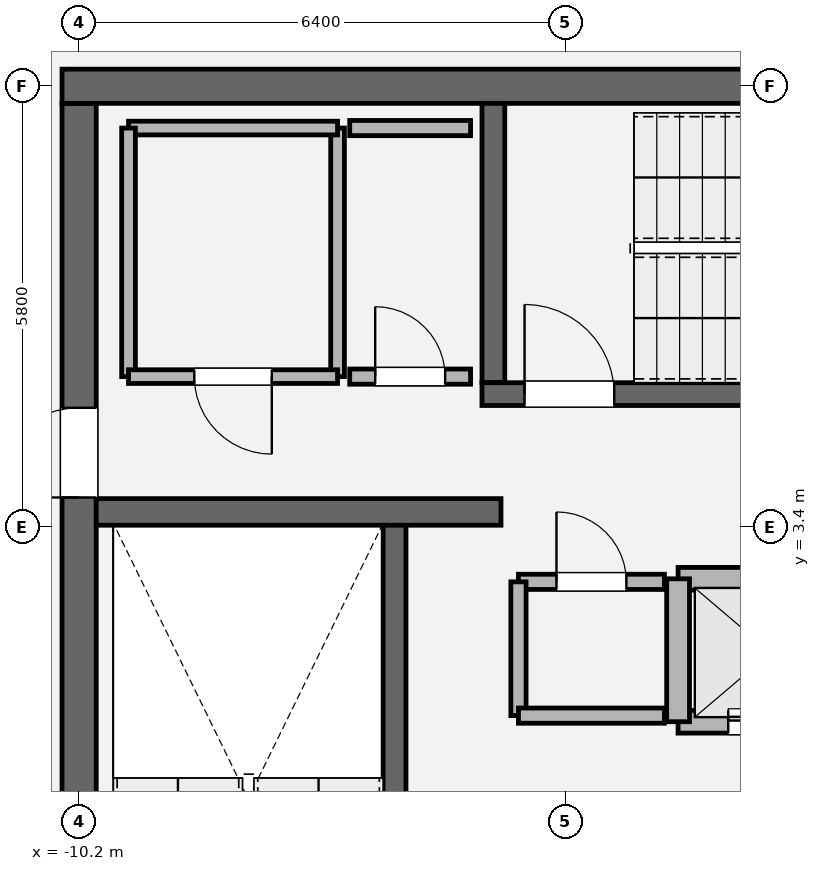
"""IFC4 building model, lengths in metres.
Left out: names, types, materials, properties, quantities, classifications, styles, units other than length and angle.
Written with IfcOpenShell. Run it as: python <this file> out.ifc"""

import sys

from ifc_helpers import new_model, si_unit, direction, frame, frame_2d, origin, place, context, subcontext, project, spatial, rectangle, extrude, element, fill, save


model = new_model("IFC4")
c1 = context("Model", 3, precision=1e-05, world=origin(), true_north=direction((0.0, 1.0)))
c2 = subcontext(c1, "Body", "Model", "MODEL_VIEW")
j1 = project(units=[si_unit("LENGTHUNIT", "METRE"), si_unit("PLANEANGLEUNIT", "RADIAN")], contexts=[c1])
p1 = place(None, origin())
s1 = spatial("IfcSite", under=j1, at=p1, CompositionType="ELEMENT")
p2 = place(p1, origin())
s2 = spatial("IfcBuilding", under=s1, at=p2, CompositionType="ELEMENT")
p3 = place(p2, frame((0.0, 0.0, 321.6)))
s3 = spatial("IfcBuildingStorey", under=s2, at=p3, CompositionType="ELEMENT", Elevation=321.6)
p4 = place(p3, frame((-10.2, -8.975, 0.0), z_axis=(0.0, 0.0, 1.0), x_axis=(0.0, 1.0, 0.0)))
e1 = element("IfcWall", 1, at=p4, inside=s3, PredefinedType="SHEAR", context=c2, shape_type="SweptSolid", body=[
    extrude(rectangle(XDim=17.95, YDim=0.45, at=frame_2d((8.975, 0.0))), origin(), (0.0, 0.0, 1.0), 4.2),
])
p5 = place(p4, frame((12.765, 0.0, 0.0)))
e2 = element("IfcOpeningElement", 2, at=p5, cuts=e1, PredefinedType="OPENING", context=c2, shape_type="SweptSolid", body=[
    extrude(rectangle(XDim=1.18, YDim=2.2, at=frame_2d((0.59, 1.1))), frame((0.0, 0.235, 0.0), z_axis=(0.0, -1.0, 0.0), x_axis=(1.0, 0.0, 0.0)), (0.0, 0.0, 1.0), 0.47),
])
p6 = place(p3, frame((-10.425, 9.2, 0.0), z_axis=(0.0, 0.0, 1.0), x_axis=(1.0, 0.0, 0.0)))
e3 = element("IfcWall", 3, at=p6, inside=s3, PredefinedType="SHEAR", context=c2, shape_type="SweptSolid", body=[
    extrude(rectangle(XDim=20.85, YDim=0.45, at=frame_2d((10.425, 0.0))), origin(), (0.0, 0.0, 1.0), 4.2),
])
p7 = place(p3, frame((-6.05, -5.5, 0.0), z_axis=(0.0, 0.0, 1.0), x_axis=(0.0, 1.0, 0.0)))
e4 = element("IfcWall", 4, at=p7, inside=s3, PredefinedType="SOLIDWALL", context=c2, shape_type="SweptSolid", body=[
    extrude(rectangle(XDim=8.95, YDim=0.3, at=frame_2d((4.475, 0.0))), origin(), (0.0, 0.0, 1.0), 4.2),
])
p8 = place(p3, frame((-4.75, 5.3, 0.0), z_axis=(0.0, 0.0, 1.0), x_axis=(0.0, 1.0, 0.0)))
e5 = element("IfcWall", 5, at=p8, inside=s3, PredefinedType="SOLIDWALL", context=c2, shape_type="SweptSolid", body=[
    extrude(rectangle(XDim=3.675, YDim=0.3, at=frame_2d((1.837, 0.0))), origin(), (0.0, 0.0, 1.0), 4.2),
])
p9 = place(p3, frame((-4.9, 5.15, 0.0), z_axis=(0.0, 0.0, 1.0), x_axis=(1.0, 0.0, 0.0)))
e6 = element("IfcWall", 6, at=p9, inside=s3, PredefinedType="SOLIDWALL", context=c2, shape_type="SweptSolid", body=[
    extrude(rectangle(XDim=9.8, YDim=0.3, at=frame_2d((4.9, 0.0))), origin(), (0.0, 0.0, 1.0), 4.2),
])
p10 = place(p9, frame((0.56, 0.0, 0.0)))
e7 = element("IfcOpeningElement", 7, at=p10, cuts=e6, PredefinedType="OPENING", context=c2, shape_type="SweptSolid", body=[
    extrude(rectangle(XDim=1.18, YDim=2.2, at=frame_2d((0.59, 1.1))), frame((0.0, 0.16, 0.0), z_axis=(0.0, -1.0, 0.0), x_axis=(1.0, 0.0, 0.0)), (0.0, 0.0, 1.0), 0.32),
])
p11 = place(p3, frame((-9.975, 3.6, 0.0), z_axis=(0.0, 0.0, 1.0), x_axis=(1.0, 0.0, 0.0)))
e8 = element("IfcWall", 8, at=p11, inside=s3, PredefinedType="SOLIDWALL", context=c2, shape_type="SweptSolid", body=[
    extrude(rectangle(XDim=5.325, YDim=0.35, at=frame_2d((2.663, 0.0))), origin(), (0.0, 0.0, 1.0), 4.2),
])
p12 = place(p3, frame((-2.32, 0.84, 0.0), z_axis=(0.0, 0.0, 1.0), x_axis=(1.0, 0.0, 0.0)))
e9 = element("IfcWall", 9, at=p12, inside=s3, PredefinedType="SOLIDWALL", context=c2, shape_type="SweptSolid", body=[
    extrude(rectangle(XDim=4.64, YDim=0.3, at=frame_2d((2.32, 0.0))), origin(), (0.0, 0.0, 1.0), 4.0),
])
p13 = place(p12, frame((0.66, 0.0, 0.0)))
e10 = element("IfcOpeningElement", 10, at=p13, cuts=e9, PredefinedType="OPENING", context=c2, shape_type="SweptSolid", body=[
    extrude(rectangle(XDim=1.12, YDim=2.25, at=frame_2d((0.56, 1.125))), frame((0.0, 0.16, 0.0), z_axis=(0.0, -1.0, 0.0), x_axis=(1.0, 0.0, 0.0)), (0.0, 0.0, 1.0), 0.32),
])
p14 = place(p12, frame((2.86, 0.0, 0.0)))
e11 = element("IfcOpeningElement", 11, at=p14, cuts=e9, PredefinedType="OPENING", context=c2, shape_type="SweptSolid", body=[
    extrude(rectangle(XDim=1.12, YDim=2.25, at=frame_2d((0.56, 1.125))), frame((0.0, 0.16, 0.0), z_axis=(0.0, -1.0, 0.0), x_axis=(1.0, 0.0, 0.0)), (0.0, 0.0, 1.0), 0.32),
])
p15 = place(p3, frame((-2.32, 2.72, 0.0), z_axis=(0.0, 0.0, 1.0), x_axis=(1.0, 0.0, 0.0)))
e12 = element("IfcWall", 12, at=p15, inside=s3, PredefinedType="SOLIDWALL", context=c2, shape_type="SweptSolid", body=[
    extrude(rectangle(XDim=4.64, YDim=0.3, at=frame_2d((2.32, 0.0))), origin(), (0.0, 0.0, 1.0), 4.0),
])
p16 = place(p3, frame((-2.32, 0.84, 0.0), z_axis=(0.0, 0.0, 1.0), x_axis=(0.0, 1.0, 0.0)))
e13 = element("IfcWall", 13, at=p16, inside=s3, PredefinedType="SOLIDWALL", context=c2, shape_type="SweptSolid", body=[
    extrude(rectangle(XDim=1.88, YDim=0.3, at=frame_2d((0.94, 0.0))), origin(), (0.0, 0.0, 1.0), 4.0),
])
p17 = place(p3, frame((-2.5, 2.68, 0.0), z_axis=(0.0, 0.0, 1.0), x_axis=(-1.0, 0.0, 0.0)))
e14 = element("IfcWall", 14, at=p17, inside=s3, PredefinedType="SOLIDWALL", context=c2, shape_type="SweptSolid", body=[
    extrude(rectangle(XDim=1.92, YDim=0.2, at=frame_2d((0.96, 0.0))), origin(), (0.0, 0.0, 1.0), 4.0),
])
p18 = place(p17, frame((0.5, 0.0, 0.0)))
e15 = element("IfcOpeningElement", 15, at=p18, cuts=e14, PredefinedType="OPENING", context=c2, shape_type="SweptSolid", body=[
    extrude(rectangle(XDim=0.92, YDim=2.1, at=frame_2d((0.46, 1.05))), frame((0.0, 0.11, 0.0), z_axis=(0.0, -1.0, 0.0), x_axis=(1.0, 0.0, 0.0)), (0.0, 0.0, 1.0), 0.22),
])
p19 = place(p3, frame((-4.42, 2.68, 0.0), z_axis=(0.0, 0.0, 1.0), x_axis=(0.0, -1.0, 0.0)))
e16 = element("IfcWall", 16, at=p19, inside=s3, PredefinedType="SOLIDWALL", context=c2, shape_type="SweptSolid", body=[
    extrude(rectangle(XDim=1.76, YDim=0.2, at=frame_2d((0.88, 0.0))), origin(), (0.0, 0.0, 1.0), 4.0),
])
p20 = place(p3, frame((-4.42, 0.92, 0.0), z_axis=(0.0, 0.0, 1.0), x_axis=(1.0, 0.0, 0.0)))
e17 = element("IfcWall", 17, at=p20, inside=s3, PredefinedType="SOLIDWALL", context=c2, shape_type="SweptSolid", body=[
    extrude(rectangle(XDim=1.92, YDim=0.2, at=frame_2d((0.96, 0.0))), origin(), (0.0, 0.0, 1.0), 4.0),
])
p21 = place(p3, frame((-6.8, 5.38, 0.0), z_axis=(0.0, 0.0, 1.0), x_axis=(0.0, 1.0, 0.0)))
e18 = element("IfcWall", 18, at=p21, inside=s3, PredefinedType="PARTITIONING", context=c2, shape_type="SweptSolid", body=[
    extrude(rectangle(XDim=3.27, YDim=0.18, at=frame_2d((1.635, 0.0))), origin(), (0.0, 0.0, 1.0), 4.0),
])
p22 = place(p3, frame((-6.8, 8.65, 0.0), z_axis=(0.0, 0.0, 1.0), x_axis=(-1.0, 0.0, 0.0)))
e19 = element("IfcWall", 19, at=p22, inside=s3, PredefinedType="PARTITIONING", context=c2, shape_type="SweptSolid", body=[
    extrude(rectangle(XDim=2.75, YDim=0.18, at=frame_2d((1.375, 0.0))), origin(), (0.0, 0.0, 1.0), 4.0),
])
p23 = place(p3, frame((-9.55, 8.65, 0.0), z_axis=(0.0, 0.0, 1.0), x_axis=(0.0, -1.0, 0.0)))
e20 = element("IfcWall", 20, at=p23, inside=s3, PredefinedType="PARTITIONING", context=c2, shape_type="SweptSolid", body=[
    extrude(rectangle(XDim=3.27, YDim=0.18, at=frame_2d((1.635, 0.0))), origin(), (0.0, 0.0, 1.0), 4.0),
])
p24 = place(p3, frame((-9.55, 5.38, 0.0), z_axis=(0.0, 0.0, 1.0), x_axis=(1.0, 0.0, 0.0)))
e21 = element("IfcWall", 21, at=p24, inside=s3, PredefinedType="PARTITIONING", context=c2, shape_type="SweptSolid", body=[
    extrude(rectangle(XDim=2.75, YDim=0.18, at=frame_2d((1.375, 0.0))), origin(), (0.0, 0.0, 1.0), 4.0),
])
p25 = place(p24, frame((0.865, 0.0, 0.0)))
e22 = element("IfcOpeningElement", 22, at=p25, cuts=e21, PredefinedType="OPENING", context=c2, shape_type="SweptSolid", body=[
    extrude(rectangle(XDim=1.02, YDim=2.2, at=frame_2d((0.51, 1.1))), frame((0.0, 0.1, 0.0), z_axis=(0.0, -1.0, 0.0), x_axis=(1.0, 0.0, 0.0)), (0.0, 0.0, 1.0), 0.2),
])
p26 = place(p3, frame((-5.05, 8.65, 0.0), z_axis=(0.0, 0.0, 1.0), x_axis=(-1.0, 0.0, 0.0)))
e23 = element("IfcWall", 23, at=p26, inside=s3, PredefinedType="SOLIDWALL", context=c2, shape_type="SweptSolid", body=[
    extrude(rectangle(XDim=1.59, YDim=0.2, at=frame_2d((0.795, 0.0))), origin(), (0.0, 0.0, 1.0), 4.0),
])
p27 = place(p3, frame((-6.64, 5.38, 0.0), z_axis=(0.0, 0.0, 1.0), x_axis=(1.0, 0.0, 0.0)))
e24 = element("IfcWall", 24, at=p27, inside=s3, PredefinedType="SOLIDWALL", context=c2, shape_type="SweptSolid", body=[
    extrude(rectangle(XDim=1.59, YDim=0.2, at=frame_2d((0.795, 0.0))), origin(), (0.0, 0.0, 1.0), 4.0),
])
p28 = place(p27, frame((0.335, 0.0, 0.0)))
e25 = element("IfcOpeningElement", 25, at=p28, cuts=e24, PredefinedType="OPENING", context=c2, shape_type="SweptSolid", body=[
    extrude(rectangle(XDim=0.92, YDim=2.1, at=frame_2d((0.46, 1.05))), frame((0.0, 0.11, 0.0), z_axis=(0.0, -1.0, 0.0), x_axis=(1.0, 0.0, 0.0)), (0.0, 0.0, 1.0), 0.22),
])
p29 = place(p10, origin())
e26 = element("IfcDoor", 26, at=p29, inside=s3, OperationType="SINGLE_SWING_LEFT", PredefinedType="DOOR", context=c2, shape_type="SweptSolid", body=[
    extrude(rectangle(XDim=1.18, YDim=2.2, at=frame_2d((0.59, 1.1))), frame((0.0, 0.025, 0.0), z_axis=(0.0, -1.0, 0.0), x_axis=(1.0, 0.0, 0.0)), (0.0, 0.0, 1.0), 0.05),
])
fill(e7, e26)
p30 = place(p5, origin())
e27 = element("IfcDoor", 27, at=p30, inside=s3, OperationType="SINGLE_SWING_LEFT", PredefinedType="DOOR", context=c2, shape_type="SweptSolid", body=[
    extrude(rectangle(XDim=1.18, YDim=2.2, at=frame_2d((0.59, 1.1))), frame((0.0, 0.025, 0.0), z_axis=(0.0, -1.0, 0.0), x_axis=(1.0, 0.0, 0.0)), (0.0, 0.0, 1.0), 0.05),
])
fill(e2, e27)
p31 = place(p13, origin())
e28 = element("IfcDoor", 28, at=p31, inside=s3, OperationType="DOUBLE_DOOR_SLIDING", PredefinedType="DOOR", context=c2, shape_type="SweptSolid", body=[
    extrude(rectangle(XDim=1.12, YDim=2.25, at=frame_2d((0.56, 1.125))), frame((0.0, 0.025, 0.0), z_axis=(0.0, -1.0, 0.0), x_axis=(1.0, 0.0, 0.0)), (0.0, 0.0, 1.0), 0.05),
])
fill(e10, e28)
p32 = place(p18, origin())
e29 = element("IfcDoor", 29, at=p32, inside=s3, OperationType="SINGLE_SWING_RIGHT", PredefinedType="DOOR", context=c2, shape_type="SweptSolid", body=[
    extrude(rectangle(XDim=0.92, YDim=2.1, at=frame_2d((0.46, 1.05))), frame((0.0, 0.025, 0.0), z_axis=(0.0, -1.0, 0.0), x_axis=(1.0, 0.0, 0.0)), (0.0, 0.0, 1.0), 0.05),
])
fill(e15, e29)
p33 = place(p25, origin())
e30 = element("IfcDoor", 30, at=p33, inside=s3, OperationType="SINGLE_SWING_RIGHT", PredefinedType="DOOR", context=c2, shape_type="SweptSolid", body=[
    extrude(rectangle(XDim=1.02, YDim=2.2, at=frame_2d((0.51, 1.1))), frame((0.0, 0.025, 0.0), z_axis=(0.0, -1.0, 0.0), x_axis=(1.0, 0.0, 0.0)), (0.0, 0.0, 1.0), 0.05),
])
fill(e22, e30)
p34 = place(p28, origin())
e31 = element("IfcDoor", 31, at=p34, inside=s3, OperationType="SINGLE_SWING_LEFT", PredefinedType="DOOR", context=c2, shape_type="SweptSolid", body=[
    extrude(rectangle(XDim=0.92, YDim=2.1, at=frame_2d((0.46, 1.05))), frame((0.0, 0.025, 0.0), z_axis=(0.0, -1.0, 0.0), x_axis=(1.0, 0.0, 0.0)), (0.0, 0.0, 1.0), 0.05),
])
fill(e25, e31)
save(model, sys.argv[1])
